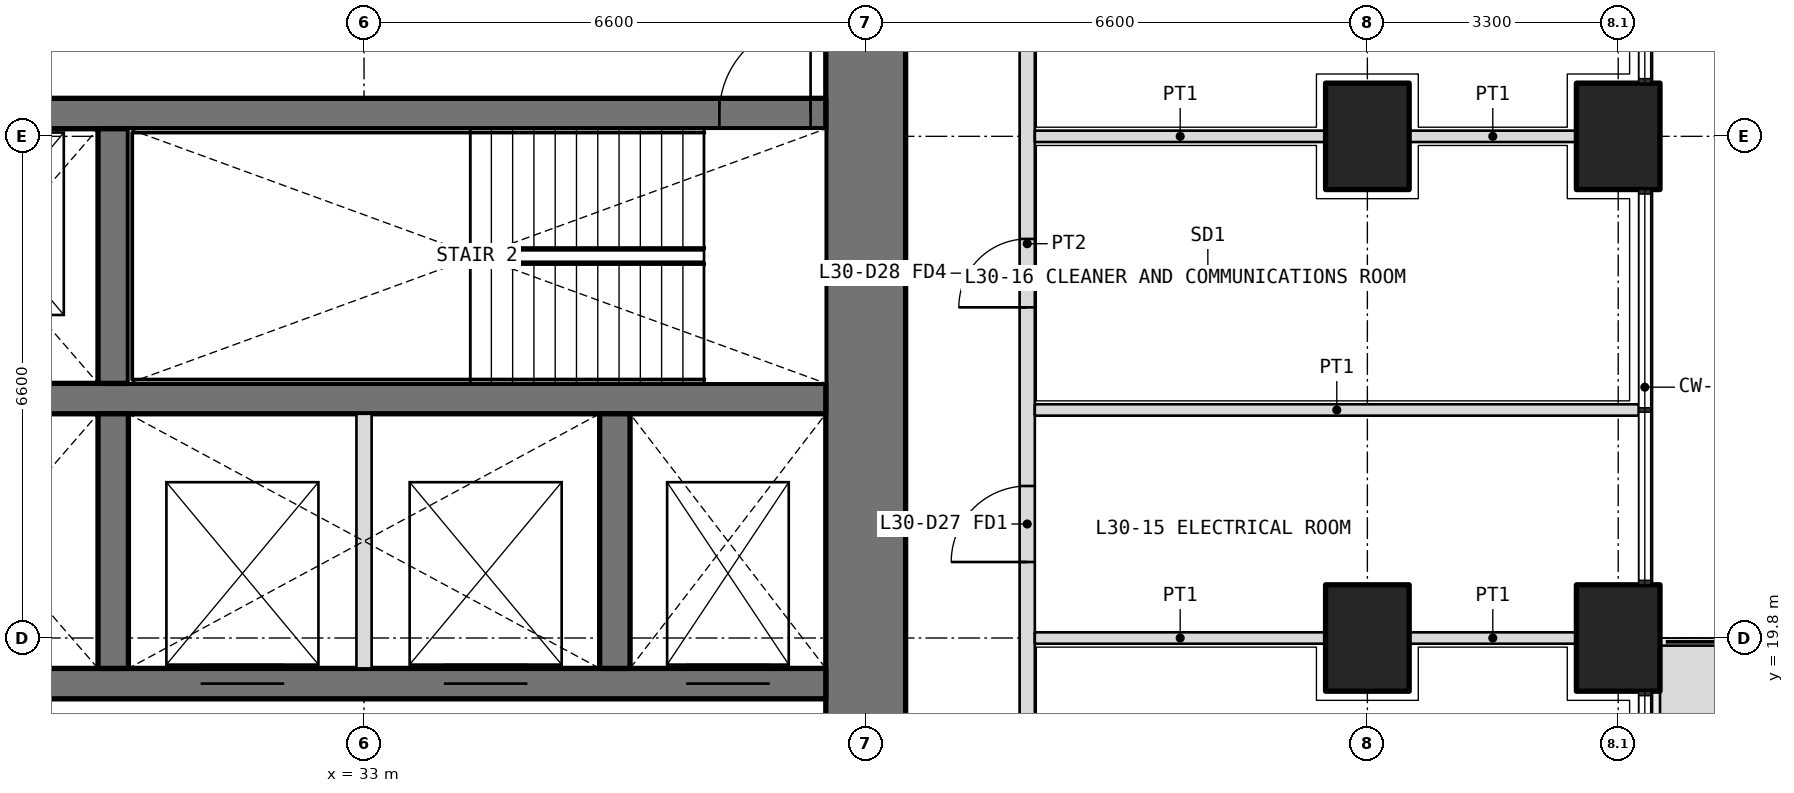
"""IFC4 building model, lengths in metres.
Left out: names, types, materials, properties, quantities, classifications, styles, units other than length and angle.
Written with IfcOpenShell. Run it as: python <this file> out.ifc"""

import sys

from ifc_helpers import new_model, si_unit, direction, frame, frame_2d, origin, origin_2d, place, context, subcontext, project, spatial, polyline, rectangle, outline, extrude, element, fill, save


model = new_model("IFC4")
c1 = context("Model", 3, precision=1e-05, world=origin(), true_north=direction((0.0, 1.0)))
c2 = subcontext(c1, "Body", "Model", "MODEL_VIEW")
j1 = project(units=[si_unit("LENGTHUNIT", "METRE"), si_unit("PLANEANGLEUNIT", "RADIAN")], contexts=[c1])
p1 = place(None, origin())
s1 = spatial("IfcSite", under=j1, at=p1, CompositionType="ELEMENT")
p2 = place(p1, origin())
s2 = spatial("IfcBuilding", under=s1, at=p2, CompositionType="ELEMENT")
p3 = place(p2, frame((0.0, 0.0, 132.6)))
s3 = spatial("IfcBuildingStorey", under=s2, at=p3, CompositionType="ELEMENT", Elevation=132.6)
for number, where, z_axis, x_axis in (
    (1, (49.5, 19.8, 0.0), (0.0, 0.0, 1.0), (0.0, 1.0, 0.0)),
    (2, (49.5, 26.4, 0.0), (0.0, 0.0, 1.0), (0.0, 1.0, 0.0)),
    (3, (46.2, 19.8, 0.0), (0.0, 0.0, 1.0), (0.0, 1.0, 0.0)),
    (4, (46.2, 26.4, 0.0), (0.0, 0.0, 1.0), (0.0, 1.0, 0.0)),
):
    element("IfcColumn", number, at=place(p3, frame(where, z_axis=z_axis, x_axis=x_axis)), inside=s3, PredefinedType="COLUMN", context=c2, shape_type="SweptSolid", body=[
        extrude(rectangle(XDim=1.4, YDim=1.1, at=origin_2d()), origin(), (0.0, 0.0, 1.0), 4.2),
    ])
p4 = place(p3, origin())
e5 = element("IfcWall", 5, at=p4, inside=s3, PredefinedType="USERDEFINED", context=c2, shape_type="SweptSolid", body=[
    extrude(outline(polyline([(50.05, 10.65), (51.05, 10.65), (51.05, 19.7), (50.05, 19.7), (50.05, 10.65)]), holes=[polyline([(50.2, 10.8), (50.9, 10.8), (50.9, 19.55), (50.2, 19.55), (50.2, 10.8)])]), origin(), (0.0, 0.0, 1.0), 1.05),
])
p5 = place(p3, frame((39.6, 13.725, 0.0), z_axis=(0.0, 0.0, 1.0), x_axis=(0.0, 1.0, 0.0)))
e6 = element("IfcWall", 6, at=p5, inside=s3, PredefinedType="SHEAR", context=c2, shape_type="SweptSolid", body=[
    extrude(rectangle(XDim=18.75, YDim=1.05, at=frame_2d((9.375, 0.0))), origin(), (0.0, 0.0, 1.0), 4.2),
])
p6 = place(p5, frame((3.025, 0.0, 0.0)))
e7 = element("IfcOpeningElement", 7, at=p6, cuts=e6, PredefinedType="OPENING", context=c2, shape_type="SweptSolid", body=[
    extrude(rectangle(XDim=1.6, YDim=2.1, at=frame_2d((0.8, 1.05))), frame((0.0, 0.535, 0.0), z_axis=(0.0, -1.0, 0.0), x_axis=(1.0, 0.0, 0.0)), (0.0, 0.0, 1.0), 1.07),
])
p7 = place(p5, frame((13.825, 0.0, 0.0)))
e8 = element("IfcOpeningElement", 8, at=p7, cuts=e6, PredefinedType="OPENING", context=c2, shape_type="SweptSolid", body=[
    extrude(rectangle(XDim=1.6, YDim=2.1, at=frame_2d((0.8, 1.05))), frame((0.0, 0.535, 0.0), z_axis=(0.0, -1.0, 0.0), x_axis=(1.0, 0.0, 0.0)), (0.0, 0.0, 1.0), 1.07),
])
p8 = place(p3, frame((13.725, 19.2, 0.0), z_axis=(0.0, 0.0, 1.0), x_axis=(1.0, 0.0, 0.0)))
e9 = element("IfcWall", 9, at=p8, inside=s3, PredefinedType="SHEAR", context=c2, shape_type="SweptSolid", body=[
    extrude(rectangle(XDim=25.35, YDim=0.4, at=frame_2d((12.675, 0.0))), origin(), (0.0, 0.0, 1.0), 4.2),
])
p9 = place(p8, frame((10.575, 0.0, 0.0)))
e10 = element("IfcOpeningElement", 10, at=p9, cuts=e9, PredefinedType="OPENING", context=c2, shape_type="SweptSolid", body=[
    extrude(rectangle(XDim=0.9, YDim=2.1, at=frame_2d((0.45, 1.05))), frame((0.0, 0.21, 0.0), z_axis=(0.0, -1.0, 0.0), x_axis=(1.0, 0.0, 0.0)), (0.0, 0.0, 1.0), 0.42),
])
p10 = place(p8, frame((13.875, 0.0, 0.0)))
e11 = element("IfcOpeningElement", 11, at=p10, cuts=e9, PredefinedType="OPENING", context=c2, shape_type="SweptSolid", body=[
    extrude(rectangle(XDim=0.9, YDim=2.1, at=frame_2d((0.45, 1.05))), frame((0.0, 0.21, 0.0), z_axis=(0.0, -1.0, 0.0), x_axis=(1.0, 0.0, 0.0)), (0.0, 0.0, 1.0), 0.42),
])
p11 = place(p8, frame((0.2, 0.0, 0.0)))
e12 = element("IfcOpeningElement", 12, at=p11, cuts=e9, PredefinedType="OPENING", context=c2, shape_type="SweptSolid", body=[
    extrude(rectangle(XDim=1.2, YDim=2.1, at=frame_2d((0.6, 1.05))), frame((0.0, 0.21, 0.0), z_axis=(0.0, -1.0, 0.0), x_axis=(1.0, 0.0, 0.0)), (0.0, 0.0, 1.0), 0.42),
])
p12 = place(p8, frame((23.512, 0.0, 0.0)))
e13 = element("IfcOpeningElement", 13, at=p12, cuts=e9, PredefinedType="OPENING", context=c2, shape_type="SweptSolid", body=[
    extrude(rectangle(XDim=1.1, YDim=2.1, at=frame_2d((0.55, 1.05))), frame((0.0, 0.21, 0.0), z_axis=(0.0, -1.0, 0.0), x_axis=(1.0, 0.0, 0.0)), (0.0, 0.0, 1.0), 0.42),
])
p13 = place(p8, frame((17.125, 0.0, 0.0)))
e14 = element("IfcOpeningElement", 14, at=p13, cuts=e9, PredefinedType="OPENING", context=c2, shape_type="SweptSolid", body=[
    extrude(rectangle(XDim=1.1, YDim=2.1, at=frame_2d((0.55, 1.05))), frame((0.0, 0.21, 0.0), z_axis=(0.0, -1.0, 0.0), x_axis=(1.0, 0.0, 0.0)), (0.0, 0.0, 1.0), 0.42),
])
p14 = place(p8, frame((20.325, 0.0, 0.0)))
e15 = element("IfcOpeningElement", 15, at=p14, cuts=e9, PredefinedType="OPENING", context=c2, shape_type="SweptSolid", body=[
    extrude(rectangle(XDim=1.1, YDim=2.1, at=frame_2d((0.55, 1.05))), frame((0.0, 0.21, 0.0), z_axis=(0.0, -1.0, 0.0), x_axis=(1.0, 0.0, 0.0)), (0.0, 0.0, 1.0), 0.42),
])
p15 = place(p3, frame((13.725, 22.95, 0.0), z_axis=(0.0, 0.0, 1.0), x_axis=(1.0, 0.0, 0.0)))
e16 = element("IfcWall", 16, at=p15, inside=s3, PredefinedType="SHEAR", context=c2, shape_type="SweptSolid", body=[
    extrude(rectangle(XDim=25.35, YDim=0.4, at=frame_2d((12.675, 0.0))), origin(), (0.0, 0.0, 1.0), 4.2),
])
p16 = place(p3, frame((13.725, 26.7, 0.0), z_axis=(0.0, 0.0, 1.0), x_axis=(1.0, 0.0, 0.0)))
e17 = element("IfcWall", 17, at=p16, inside=s3, PredefinedType="SHEAR", context=c2, shape_type="SweptSolid", body=[
    extrude(rectangle(XDim=25.35, YDim=0.4, at=frame_2d((12.675, 0.0))), origin(), (0.0, 0.0, 1.0), 4.2),
])
p17 = place(p16, frame((23.95, 0.0, 0.0)))
e18 = element("IfcOpeningElement", 18, at=p17, cuts=e17, PredefinedType="OPENING", context=c2, shape_type="SweptSolid", body=[
    extrude(rectangle(XDim=1.2, YDim=2.1, at=frame_2d((0.6, 1.05))), frame((0.0, 0.21, 0.0), z_axis=(0.0, -1.0, 0.0), x_axis=(1.0, 0.0, 0.0)), (0.0, 0.0, 1.0), 0.42),
])
p18 = place(p16, frame((0.738, 0.0, 0.0)))
e19 = element("IfcOpeningElement", 19, at=p18, cuts=e17, PredefinedType="OPENING", context=c2, shape_type="SweptSolid", body=[
    extrude(rectangle(XDim=1.1, YDim=2.1, at=frame_2d((0.55, 1.05))), frame((0.0, 0.21, 0.0), z_axis=(0.0, -1.0, 0.0), x_axis=(1.0, 0.0, 0.0)), (0.0, 0.0, 1.0), 0.42),
])
p19 = place(p16, frame((3.925, 0.0, 0.0)))
e20 = element("IfcOpeningElement", 20, at=p19, cuts=e17, PredefinedType="OPENING", context=c2, shape_type="SweptSolid", body=[
    extrude(rectangle(XDim=1.1, YDim=2.1, at=frame_2d((0.55, 1.05))), frame((0.0, 0.21, 0.0), z_axis=(0.0, -1.0, 0.0), x_axis=(1.0, 0.0, 0.0)), (0.0, 0.0, 1.0), 0.42),
])
p20 = place(p16, frame((7.175, 0.0, 0.0)))
e21 = element("IfcOpeningElement", 21, at=p20, cuts=e17, PredefinedType="OPENING", context=c2, shape_type="SweptSolid", body=[
    extrude(rectangle(XDim=1.1, YDim=2.1, at=frame_2d((0.55, 1.05))), frame((0.0, 0.21, 0.0), z_axis=(0.0, -1.0, 0.0), x_axis=(1.0, 0.0, 0.0)), (0.0, 0.0, 1.0), 0.42),
])
p21 = place(p16, frame((10.425, 0.0, 0.0)))
e22 = element("IfcOpeningElement", 22, at=p21, cuts=e17, PredefinedType="OPENING", context=c2, shape_type="SweptSolid", body=[
    extrude(rectangle(XDim=1.1, YDim=2.1, at=frame_2d((0.55, 1.05))), frame((0.0, 0.21, 0.0), z_axis=(0.0, -1.0, 0.0), x_axis=(1.0, 0.0, 0.0)), (0.0, 0.0, 1.0), 0.42),
])
p22 = place(p16, frame((13.775, 0.0, 0.0)))
e23 = element("IfcOpeningElement", 23, at=p22, cuts=e17, PredefinedType="OPENING", context=c2, shape_type="SweptSolid", body=[
    extrude(rectangle(XDim=1.1, YDim=2.1, at=frame_2d((0.55, 1.05))), frame((0.0, 0.21, 0.0), z_axis=(0.0, -1.0, 0.0), x_axis=(1.0, 0.0, 0.0)), (0.0, 0.0, 1.0), 0.42),
])
for number, where, z_axis, x_axis in (
    (24, (29.7, 19.4, 0.0), (0.0, 0.0, 1.0), (0.0, 1.0, 0.0)),
    (25, (36.3, 19.4, 0.0), (0.0, 0.0, 1.0), (0.0, 1.0, 0.0)),
    (26, (29.7, 23.15, 0.0), (0.0, 0.0, 1.0), (0.0, 1.0, 0.0)),
):
    element("IfcWall", number, at=place(p3, frame(where, z_axis=z_axis, x_axis=x_axis)), inside=s3, PredefinedType="SHEAR", context=c2, shape_type="SweptSolid", body=[
        extrude(rectangle(XDim=3.35, YDim=0.4, at=frame_2d((1.675, 0.0))), origin(), (0.0, 0.0, 1.0), 4.2),
    ])
p23 = place(p3, frame((33.0, 19.4, 0.0), z_axis=(0.0, 0.0, 1.0), x_axis=(0.0, 1.0, 0.0)))
e27 = element("IfcWall", 27, at=p23, inside=s3, PredefinedType="PARTITIONING", context=c2, shape_type="SweptSolid", body=[
    extrude(rectangle(XDim=3.35, YDim=0.2, at=frame_2d((1.675, 0.0))), origin(), (0.0, 0.0, 1.0), 4.2),
])
p24 = place(p3, frame((41.725, 11.175, 0.0), z_axis=(0.0, 0.0, 1.0), x_axis=(0.0, 1.0, 0.0)))
e28 = element("IfcWall", 28, at=p24, inside=s3, PredefinedType="PARTITIONING", context=c2, shape_type="SweptSolid", body=[
    extrude(rectangle(XDim=27.625, YDim=0.2, at=frame_2d((13.812, 0.0))), origin(), (0.0, 0.0, 1.0), 2.85),
])
p25 = place(p24, frame((3.762, 0.0, 0.0)))
e29 = element("IfcOpeningElement", 29, at=p25, cuts=e28, PredefinedType="OPENING", context=c2, shape_type="SweptSolid", body=[
    extrude(rectangle(XDim=1.0, YDim=2.1, at=frame_2d((0.5, 1.05))), frame((0.0, 0.11, 0.0), z_axis=(0.0, -1.0, 0.0), x_axis=(1.0, 0.0, 0.0)), (0.0, 0.0, 1.0), 0.22),
])
p26 = place(p24, frame((9.625, 0.0, 0.0)))
e30 = element("IfcOpeningElement", 30, at=p26, cuts=e28, PredefinedType="OPENING", context=c2, shape_type="SweptSolid", body=[
    extrude(rectangle(XDim=1.0, YDim=2.1, at=frame_2d((0.5, 1.05))), frame((0.0, 0.11, 0.0), z_axis=(0.0, -1.0, 0.0), x_axis=(1.0, 0.0, 0.0)), (0.0, 0.0, 1.0), 0.22),
])
p27 = place(p24, frame((12.975, 0.0, 0.0)))
e31 = element("IfcOpeningElement", 31, at=p27, cuts=e28, PredefinedType="OPENING", context=c2, shape_type="SweptSolid", body=[
    extrude(rectangle(XDim=0.9, YDim=2.1, at=frame_2d((0.45, 1.05))), frame((0.0, 0.11, 0.0), z_axis=(0.0, -1.0, 0.0), x_axis=(1.0, 0.0, 0.0)), (0.0, 0.0, 1.0), 0.22),
])
p28 = place(p24, frame((19.675, 0.0, 0.0)))
e32 = element("IfcOpeningElement", 32, at=p28, cuts=e28, PredefinedType="OPENING", context=c2, shape_type="SweptSolid", body=[
    extrude(rectangle(XDim=1.0, YDim=2.1, at=frame_2d((0.5, 1.05))), frame((0.0, 0.11, 0.0), z_axis=(0.0, -1.0, 0.0), x_axis=(1.0, 0.0, 0.0)), (0.0, 0.0, 1.0), 0.22),
])
p29 = place(p24, frame((25.925, 0.0, 0.0)))
e33 = element("IfcOpeningElement", 33, at=p29, cuts=e28, PredefinedType="OPENING", context=c2, shape_type="SweptSolid", body=[
    extrude(rectangle(XDim=1.0, YDim=2.1, at=frame_2d((0.5, 1.05))), frame((0.0, 0.11, 0.0), z_axis=(0.0, -1.0, 0.0), x_axis=(1.0, 0.0, 0.0)), (0.0, 0.0, 1.0), 0.22),
])
p30 = place(p3, frame((49.77, 22.8, 0.0), z_axis=(0.0, 0.0, 1.0), x_axis=(-1.0, 0.0, 0.0)))
e34 = element("IfcWall", 34, at=p30, inside=s3, PredefinedType="PARTITIONING", context=c2, shape_type="SweptSolid", body=[
    extrude(rectangle(XDim=7.945, YDim=0.15, at=frame_2d((3.973, 0.0))), origin(), (0.0, 0.0, 1.0), 2.7),
])
p31 = place(p3, frame((48.95, 19.8, 0.0), z_axis=(0.0, 0.0, 1.0), x_axis=(-1.0, 0.0, 0.0)))
e35 = element("IfcWall", 35, at=p31, inside=s3, PredefinedType="PARTITIONING", context=c2, shape_type="SweptSolid", body=[
    extrude(rectangle(XDim=2.2, YDim=0.15, at=frame_2d((1.1, 0.0))), origin(), (0.0, 0.0, 1.0), 2.85),
])
p32 = place(p3, frame((45.65, 19.8, 0.0), z_axis=(0.0, 0.0, 1.0), x_axis=(-1.0, 0.0, 0.0)))
e36 = element("IfcWall", 36, at=p32, inside=s3, PredefinedType="PARTITIONING", context=c2, shape_type="SweptSolid", body=[
    extrude(rectangle(XDim=3.825, YDim=0.15, at=frame_2d((1.913, 0.0))), origin(), (0.0, 0.0, 1.0), 2.85),
])
p33 = place(p3, frame((48.95, 26.4, 0.0), z_axis=(0.0, 0.0, 1.0), x_axis=(-1.0, 0.0, 0.0)))
e37 = element("IfcWall", 37, at=p33, inside=s3, PredefinedType="PARTITIONING", context=c2, shape_type="SweptSolid", body=[
    extrude(rectangle(XDim=2.2, YDim=0.15, at=frame_2d((1.1, 0.0))), origin(), (0.0, 0.0, 1.0), 2.85),
])
p34 = place(p3, frame((45.65, 26.4, 0.0), z_axis=(0.0, 0.0, 1.0), x_axis=(-1.0, 0.0, 0.0)))
e38 = element("IfcWall", 38, at=p34, inside=s3, PredefinedType="PARTITIONING", context=c2, shape_type="SweptSolid", body=[
    extrude(rectangle(XDim=3.825, YDim=0.15, at=frame_2d((1.913, 0.0))), origin(), (0.0, 0.0, 1.0), 2.85),
])
p35 = place(p26, origin())
e39 = element("IfcDoor", 39, at=p35, inside=s3, OperationType="SINGLE_SWING_LEFT", PredefinedType="DOOR", context=c2, shape_type="SweptSolid", body=[
    extrude(rectangle(XDim=1.0, YDim=2.1, at=frame_2d((0.5, 1.05))), frame((0.0, 0.025, 0.0), z_axis=(0.0, -1.0, 0.0), x_axis=(1.0, 0.0, 0.0)), (0.0, 0.0, 1.0), 0.05),
])
fill(e30, e39)
p36 = place(p27, origin())
e40 = element("IfcDoor", 40, at=p36, inside=s3, OperationType="SINGLE_SWING_LEFT", PredefinedType="DOOR", context=c2, shape_type="SweptSolid", body=[
    extrude(rectangle(XDim=0.9, YDim=2.1, at=frame_2d((0.45, 1.05))), frame((0.0, 0.025, 0.0), z_axis=(0.0, -1.0, 0.0), x_axis=(1.0, 0.0, 0.0)), (0.0, 0.0, 1.0), 0.05),
])
fill(e31, e40)
p37 = place(p17, origin())
e41 = element("IfcDoor", 41, at=p37, inside=s3, OperationType="SINGLE_SWING_RIGHT", PredefinedType="DOOR", context=c2, shape_type="SweptSolid", body=[
    extrude(rectangle(XDim=1.2, YDim=2.1, at=frame_2d((0.6, 1.05))), frame((0.0, 0.025, 0.0), z_axis=(0.0, -1.0, 0.0), x_axis=(1.0, 0.0, 0.0)), (0.0, 0.0, 1.0), 0.05),
])
fill(e18, e41)
p38 = place(p12, origin())
e42 = element("IfcDoor", 42, at=p38, inside=s3, OperationType="DOUBLE_DOOR_SLIDING", PredefinedType="DOOR", context=c2, shape_type="SweptSolid", body=[
    extrude(rectangle(XDim=1.1, YDim=2.1, at=frame_2d((0.55, 1.05))), frame((0.0, 0.025, 0.0), z_axis=(0.0, -1.0, 0.0), x_axis=(1.0, 0.0, 0.0)), (0.0, 0.0, 1.0), 0.05),
])
fill(e13, e42)
p39 = place(p13, origin())
e43 = element("IfcDoor", 43, at=p39, inside=s3, OperationType="DOUBLE_DOOR_SLIDING", PredefinedType="DOOR", context=c2, shape_type="SweptSolid", body=[
    extrude(rectangle(XDim=1.1, YDim=2.1, at=frame_2d((0.55, 1.05))), frame((0.0, 0.025, 0.0), z_axis=(0.0, -1.0, 0.0), x_axis=(1.0, 0.0, 0.0)), (0.0, 0.0, 1.0), 0.05),
])
fill(e14, e43)
p40 = place(p14, origin())
e44 = element("IfcDoor", 44, at=p40, inside=s3, OperationType="DOUBLE_DOOR_SLIDING", PredefinedType="DOOR", context=c2, shape_type="SweptSolid", body=[
    extrude(rectangle(XDim=1.1, YDim=2.1, at=frame_2d((0.55, 1.05))), frame((0.0, 0.025, 0.0), z_axis=(0.0, -1.0, 0.0), x_axis=(1.0, 0.0, 0.0)), (0.0, 0.0, 1.0), 0.05),
])
fill(e15, e44)
save(model, sys.argv[1])
